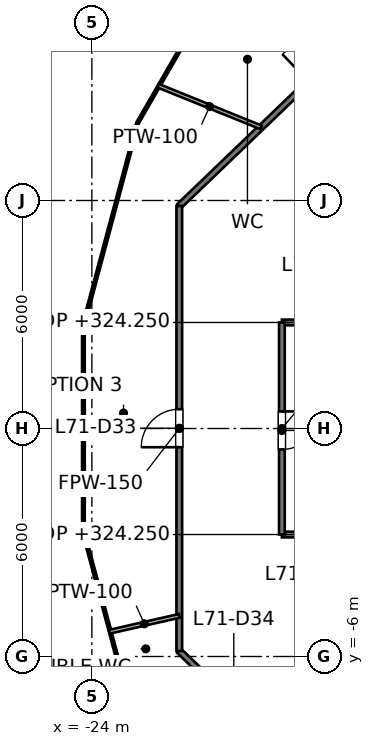
"""IFC4 building model, lengths in metres.
Left out: names, types, materials, properties, quantities, classifications, styles, units other than length and angle.
Written with IfcOpenShell. Run it as: python <this file> out.ifc"""

import sys

from ifc_helpers import new_model, si_unit, direction, frame, frame_2d, origin, place, context, subcontext, project, spatial, rectangle, extrude, element, fill, save


model = new_model("IFC4")
c1 = context("Model", 3, precision=1e-05, world=origin(), true_north=direction((0.0, 1.0)))
c2 = subcontext(c1, "Body", "Model", "MODEL_VIEW")
j1 = project(units=[si_unit("LENGTHUNIT", "METRE"), si_unit("PLANEANGLEUNIT", "RADIAN")], contexts=[c1])
p1 = place(None, origin())
s1 = spatial("IfcSite", under=j1, at=p1, CompositionType="ELEMENT")
p2 = place(p1, origin())
s2 = spatial("IfcBuilding", under=s1, at=p2, CompositionType="ELEMENT")
p3 = place(p2, frame((0.0, 0.0, 320.4)))
s3 = spatial("IfcBuildingStorey", under=s2, at=p3, CompositionType="ELEMENT", Elevation=320.4)
p4 = place(p3, frame((-21.7, -5.855, 0.0), z_axis=(0.0, 0.0, 1.0), x_axis=(0.721260272646, -0.692664145963, 0.0)))
e1 = element("IfcWall", 1, at=p4, inside=s3, PredefinedType="PARTITIONING", context=c2, shape_type="SweptSolid", body=[
    extrude(rectangle(XDim=11.252, YDim=0.15, at=frame_2d((5.626, 0.0))), origin(), (0.0, 0.0, 1.0), 3.076),
])
p5 = place(p4, frame((1.489, 0.0, 0.0)))
e2 = element("IfcOpeningElement", 2, at=p5, cuts=e1, PredefinedType="OPENING", context=c2, shape_type="SweptSolid", body=[
    extrude(rectangle(XDim=1.0, YDim=2.1, at=frame_2d((0.5, 1.05))), frame((0.0, 0.075, 0.0), z_axis=(0.0, -1.0, 0.0), x_axis=(1.0, 0.0, 0.0)), (0.0, 0.0, 1.0), 0.15),
])
p6 = place(p4, frame((4.109, 0.0, 0.0)))
e3 = element("IfcOpeningElement", 3, at=p6, cuts=e1, PredefinedType="OPENING", context=c2, shape_type="SweptSolid", body=[
    extrude(rectangle(XDim=1.0, YDim=2.1, at=frame_2d((0.5, 1.05))), frame((0.0, 0.075, 0.0), z_axis=(0.0, -1.0, 0.0), x_axis=(1.0, 0.0, 0.0)), (0.0, 0.0, 1.0), 0.15),
])
p7 = place(p4, frame((7.748, 0.0, 0.0)))
e4 = element("IfcOpeningElement", 4, at=p7, cuts=e1, PredefinedType="OPENING", context=c2, shape_type="SweptSolid", body=[
    extrude(rectangle(XDim=1.0, YDim=2.1, at=frame_2d((0.5, 1.05))), frame((0.0, 0.075, 0.0), z_axis=(0.0, -1.0, 0.0), x_axis=(1.0, 0.0, 0.0)), (0.0, 0.0, 1.0), 0.15),
])
for number, where, z_axis, x_axis in (
    (5, (-19.0, -2.79, 0.0), (0.0, 0.0, 1.0), (1.0, 0.0, 0.0)),
    (6, (-19.0, 2.79, 0.0), (0.0, 0.0, 1.0), (1.0, 0.0, 0.0)),
):
    element("IfcWall", number, at=place(p3, frame(where, z_axis=z_axis, x_axis=x_axis)), inside=s3, PredefinedType="PARTITIONING", context=c2, shape_type="SweptSolid", body=[
        extrude(rectangle(XDim=4.0, YDim=0.15, at=frame_2d((2.0, 0.0))), origin(), (0.0, 0.0, 1.0), 3.85),
    ])
p8 = place(p3, frame((-21.7, 5.855, 0.0), z_axis=(0.0, 0.0, 1.0), x_axis=(0.721260272646, 0.692664145963, 0.0)))
e7 = element("IfcWall", 7, at=p8, inside=s3, PredefinedType="PARTITIONING", context=c2, shape_type="SweptSolid", body=[
    extrude(rectangle(XDim=11.252, YDim=0.15, at=frame_2d((5.626, 0.0))), origin(), (0.0, 0.0, 1.0), 3.076),
])
p9 = place(p8, frame((4.723, 0.0, 0.0)))
e8 = element("IfcOpeningElement", 8, at=p9, cuts=e7, PredefinedType="OPENING", context=c2, shape_type="SweptSolid", body=[
    extrude(rectangle(XDim=1.0, YDim=2.1, at=frame_2d((0.5, 1.05))), frame((0.0, 0.075, 0.0), z_axis=(0.0, -1.0, 0.0), x_axis=(1.0, 0.0, 0.0)), (0.0, 0.0, 1.0), 0.15),
])
p10 = place(p3, frame((-19.0, -2.79, 0.0), z_axis=(0.0, 0.0, 1.0), x_axis=(0.0, 1.0, 0.0)))
e9 = element("IfcWall", 9, at=p10, inside=s3, PredefinedType="PARTITIONING", context=c2, shape_type="SweptSolid", body=[
    extrude(rectangle(XDim=5.58, YDim=0.15, at=frame_2d((2.79, 0.0))), origin(), (0.0, 0.0, 1.0), 3.076),
])
p11 = place(p10, frame((2.239, 0.0, 0.0)))
e10 = element("IfcOpeningElement", 10, at=p11, cuts=e9, PredefinedType="OPENING", context=c2, shape_type="SweptSolid", body=[
    extrude(rectangle(XDim=1.0, YDim=2.1, at=frame_2d((0.5, 1.05))), frame((0.0, 0.075, 0.0), z_axis=(0.0, -1.0, 0.0), x_axis=(1.0, 0.0, 0.0)), (0.0, 0.0, 1.0), 0.15),
])
p12 = place(p3, frame((-21.7, -5.855, 0.0), z_axis=(0.0, 0.0, 1.0), x_axis=(0.0, 1.0, 0.0)))
e11 = element("IfcWall", 11, at=p12, inside=s3, PredefinedType="PARTITIONING", context=c2, shape_type="SweptSolid", body=[
    extrude(rectangle(XDim=11.71, YDim=0.15, at=frame_2d((5.855, 0.0))), origin(), (0.0, 0.0, 1.0), 3.076),
])
p13 = place(p12, frame((5.362, 0.0, 0.0)))
e12 = element("IfcOpeningElement", 12, at=p13, cuts=e11, PredefinedType="OPENING", context=c2, shape_type="SweptSolid", body=[
    extrude(rectangle(XDim=1.0, YDim=2.1, at=frame_2d((0.5, 1.05))), frame((0.0, 0.075, 0.0), z_axis=(0.0, -1.0, 0.0), x_axis=(1.0, 0.0, 0.0)), (0.0, 0.0, 1.0), 0.15),
])
p14 = place(p3, frame((-22.256, 9.02, 0.0), z_axis=(0.0, 0.0, 1.0), x_axis=(0.926895618022, -0.375319215192, 0.0)))
e13 = element("IfcWall", 13, at=p14, inside=s3, PredefinedType="PARTITIONING", context=c2, shape_type="SweptSolid", body=[
    extrude(rectangle(XDim=2.923, YDim=0.1, at=frame_2d((1.461, 0.0))), origin(), (0.0, 0.0, 1.0), 3.527),
])
p15 = place(p3, frame((-23.539, -5.349, 0.0), z_axis=(0.0, 0.0, 1.0), x_axis=(0.975106145997, 0.221738593932, 0.0)))
e14 = element("IfcWall", 14, at=p15, inside=s3, PredefinedType="PARTITIONING", context=c2, shape_type="SweptSolid", body=[
    extrude(rectangle(XDim=1.886, YDim=0.1, at=frame_2d((0.943, 0.0))), origin(), (0.0, 0.0, 1.0), 3.527),
])
p16 = place(p11, origin())
e15 = element("IfcDoor", 15, at=p16, inside=s3, OperationType="SINGLE_SWING_RIGHT", PredefinedType="DOOR", context=c2, shape_type="SweptSolid", body=[
    extrude(rectangle(XDim=1.0, YDim=2.1, at=frame_2d((0.5, 1.05))), frame((0.0, 0.025, 0.0), z_axis=(0.0, -1.0, 0.0), x_axis=(1.0, 0.0, 0.0)), (0.0, 0.0, 1.0), 0.05),
])
fill(e10, e15)
p17 = place(p13, origin())
e16 = element("IfcDoor", 16, at=p17, inside=s3, OperationType="SINGLE_SWING_LEFT", PredefinedType="DOOR", context=c2, shape_type="SweptSolid", body=[
    extrude(rectangle(XDim=1.0, YDim=2.1, at=frame_2d((0.5, 1.05))), frame((0.0, 0.025, 0.0), z_axis=(0.0, -1.0, 0.0), x_axis=(1.0, 0.0, 0.0)), (0.0, 0.0, 1.0), 0.05),
])
fill(e12, e16)
save(model, sys.argv[1])
